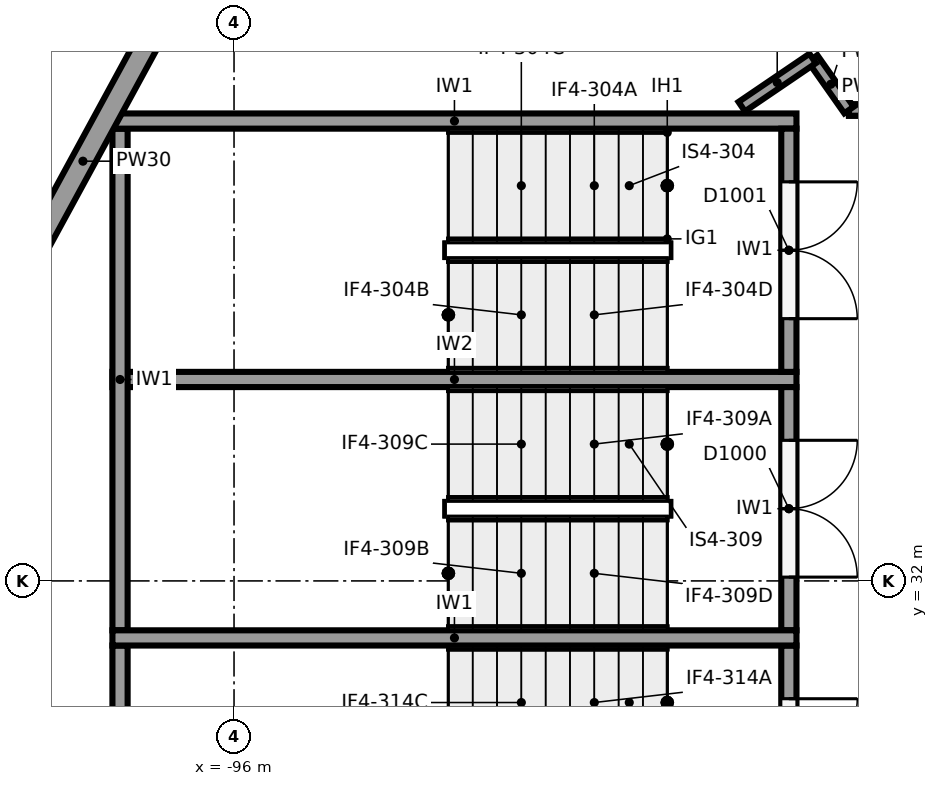
"""IFC4 building model, lengths in metres.
Left out: names, types, materials, properties, quantities, classifications, styles, units other than length and angle.
Written with IfcOpenShell. Run it as: python <this file> out.ifc"""

import sys

from ifc_helpers import new_model, si_unit, direction, frame, frame_2d, origin, place, context, subcontext, project, spatial, rectangle, extrude, element, fill, save


model = new_model("IFC4")
c1 = context("Model", 3, precision=1e-05, world=origin(), true_north=direction((0.0, 1.0)))
c2 = subcontext(c1, "Body", "Model", "MODEL_VIEW")
j1 = project(units=[si_unit("LENGTHUNIT", "METRE"), si_unit("PLANEANGLEUNIT", "RADIAN")], contexts=[c1])
p1 = place(None, origin())
s1 = spatial("IfcSite", under=j1, at=p1, CompositionType="ELEMENT")
p2 = place(p1, origin())
s2 = spatial("IfcBuilding", under=s1, at=p2, CompositionType="ELEMENT")
p3 = place(p2, frame((0.0, 0.0, 12.0)))
s3 = spatial("IfcBuildingStorey", under=s2, at=p3, CompositionType="ELEMENT", Elevation=12.0)
p4 = place(p3, frame((-101.161, 31.689, 0.0), z_axis=(0.0, 0.0, 1.0), x_axis=(0.477867771117, 0.878431780691, 0.0)))
e1 = element("IfcWall", 1, at=p4, inside=s3, PredefinedType="SOLIDWALL", context=c2, shape_type="SweptSolid", body=[
    extrude(rectangle(XDim=13.28, YDim=0.3, at=frame_2d((6.64, 0.0))), origin(), (0.0, 0.0, 1.0), 4.35),
])
p5 = place(p4, frame((9.03, 0.0, 0.0)))
e2 = element("IfcOpeningElement", 2, at=p5, cuts=e1, PredefinedType="OPENING", context=c2, shape_type="SweptSolid", body=[
    extrude(rectangle(XDim=1.8, YDim=2.4, at=frame_2d((0.9, 1.2))), frame((0.0, 0.16, 0.0), z_axis=(0.0, -1.0, 0.0), x_axis=(1.0, 0.0, 0.0)), (0.0, 0.0, 1.0), 0.32),
])
p6 = place(p3, frame((-94.815, 19.145, 0.0), z_axis=(0.0, 0.0, 1.0), x_axis=(-0.477867771117, 0.878431780691, 0.0)))
e3 = element("IfcWall", 3, at=p6, inside=s3, PredefinedType="SOLIDWALL", context=c2, shape_type="SweptSolid", body=[
    extrude(rectangle(XDim=13.28, YDim=0.3, at=frame_2d((6.64, 0.0))), origin(), (0.0, 0.0, 1.0), 4.35),
])
for number, where, z_axis, x_axis in (
    (4, (-97.6, 38.05, 0.0), (0.0, 0.0, 1.0), (1.0, 0.0, 0.0)),
    (5, (-97.6, 31.25, 0.0), (0.0, 0.0, 1.0), (1.0, 0.0, 0.0)),
):
    element("IfcWall", number, at=place(p3, frame(where, z_axis=z_axis, x_axis=x_axis)), inside=s3, PredefinedType="SHEAR", context=c2, shape_type="SweptSolid", body=[
        extrude(rectangle(XDim=9.0, YDim=0.2, at=frame_2d((4.5, 0.0))), origin(), (0.0, 0.0, 1.0), 5.65),
    ])
for number, where, z_axis, x_axis in (
    (6, (-97.5, 37.95, 0.0), (0.0, 0.0, 1.0), (0.0, -1.0, 0.0)),
    (7, (-97.5, 31.15, 0.0), (0.0, 0.0, 1.0), (0.0, -1.0, 0.0)),
):
    element("IfcWall", number, at=place(p3, frame(where, z_axis=z_axis, x_axis=x_axis)), inside=s3, PredefinedType="SHEAR", context=c2, shape_type="SweptSolid", body=[
        extrude(rectangle(XDim=6.6, YDim=0.2, at=frame_2d((3.3, 0.0))), origin(), (0.0, 0.0, 1.0), 5.65),
    ])
p7 = place(p3, frame((-97.6, 34.65, 0.0), z_axis=(0.0, 0.0, 1.0), x_axis=(1.0, 0.0, 0.0)))
e8 = element("IfcWall", 8, at=p7, inside=s3, PredefinedType="SHEAR", context=c2, shape_type="SweptSolid", body=[
    extrude(rectangle(XDim=9.0, YDim=0.2, at=frame_2d((4.5, 0.0))), origin(), (0.0, 0.0, 1.0), 5.65),
])
p8 = place(p3, frame((-88.7, 37.95, 0.0), z_axis=(0.0, 0.0, 1.0), x_axis=(0.0, -1.0, 0.0)))
e9 = element("IfcWall", 9, at=p8, inside=s3, PredefinedType="SHEAR", context=c2, shape_type="SweptSolid", body=[
    extrude(rectangle(XDim=3.2, YDim=0.2, at=frame_2d((1.6, 0.0))), origin(), (0.0, 0.0, 1.0), 5.65),
])
p9 = place(p8, frame((0.7, 0.0, 0.0)))
e10 = element("IfcOpeningElement", 10, at=p9, cuts=e9, PredefinedType="OPENING", context=c2, shape_type="SweptSolid", body=[
    extrude(rectangle(XDim=1.8, YDim=2.1, at=frame_2d((0.9, 1.05))), frame((0.0, 0.11, 0.0), z_axis=(0.0, -1.0, 0.0), x_axis=(1.0, 0.0, 0.0)), (0.0, 0.0, 1.0), 0.22),
])
p10 = place(p3, frame((-88.7, 34.55, 0.0), z_axis=(0.0, 0.0, 1.0), x_axis=(0.0, -1.0, 0.0)))
e11 = element("IfcWall", 11, at=p10, inside=s3, PredefinedType="SHEAR", context=c2, shape_type="SweptSolid", body=[
    extrude(rectangle(XDim=3.2, YDim=0.2, at=frame_2d((1.6, 0.0))), origin(), (0.0, 0.0, 1.0), 5.65),
])
p11 = place(p10, frame((0.7, 0.0, 0.0)))
e12 = element("IfcOpeningElement", 12, at=p11, cuts=e11, PredefinedType="OPENING", context=c2, shape_type="SweptSolid", body=[
    extrude(rectangle(XDim=1.8, YDim=2.1, at=frame_2d((0.9, 1.05))), frame((0.0, 0.11, 0.0), z_axis=(0.0, -1.0, 0.0), x_axis=(1.0, 0.0, 0.0)), (0.0, 0.0, 1.0), 0.22),
])
p12 = place(p3, frame((-88.7, 31.15, 0.0), z_axis=(0.0, 0.0, 1.0), x_axis=(0.0, -1.0, 0.0)))
e13 = element("IfcWall", 13, at=p12, inside=s3, PredefinedType="SHEAR", context=c2, shape_type="SweptSolid", body=[
    extrude(rectangle(XDim=3.2, YDim=0.2, at=frame_2d((1.6, 0.0))), origin(), (0.0, 0.0, 1.0), 5.65),
])
p13 = place(p12, frame((0.7, 0.0, 0.0)))
e14 = element("IfcOpeningElement", 14, at=p13, cuts=e13, PredefinedType="OPENING", context=c2, shape_type="SweptSolid", body=[
    extrude(rectangle(XDim=1.8, YDim=2.1, at=frame_2d((0.9, 1.05))), frame((0.0, 0.11, 0.0), z_axis=(0.0, -1.0, 0.0), x_axis=(1.0, 0.0, 0.0)), (0.0, 0.0, 1.0), 0.22),
])
p14 = place(p3, frame((-81.555, 38.195, 0.0), z_axis=(0.0, 0.0, 1.0), x_axis=(-1.0, 0.0, 0.0)))
e15 = element("IfcWall", 15, at=p14, inside=s3, PredefinedType="PARTITIONING", context=c2, shape_type="SweptSolid", body=[
    extrude(rectangle(XDim=6.354, YDim=0.15, at=frame_2d((3.177, 0.0))), origin(), (0.0, 0.0, 1.0), 4.35),
])
p15 = place(p14, frame((3.85, 0.0, 0.0)))
e16 = element("IfcOpeningElement", 16, at=p15, cuts=e15, PredefinedType="OPENING", context=c2, shape_type="SweptSolid", body=[
    extrude(rectangle(XDim=1.8, YDim=2.1, at=frame_2d((0.9, 1.05))), frame((0.0, 0.085, 0.0), z_axis=(0.0, -1.0, 0.0), x_axis=(1.0, 0.0, 0.0)), (0.0, 0.0, 1.0), 0.17),
])
p16 = place(p3, frame((-87.255, 38.195, 4.35), z_axis=(0.0, 0.0, 1.0), x_axis=(-1.0, 0.0, 0.0)))
e17 = element("IfcWall", 17, at=p16, inside=s3, PredefinedType="PARTITIONING", context=c2, shape_type="SweptSolid", body=[
    extrude(rectangle(XDim=0.654, YDim=0.15, at=frame_2d((0.327, 0.0))), origin(), (0.0, 0.0, 1.0), 1.3),
])
p17 = place(p3, frame((-87.909, 38.195, 0.0), z_axis=(0.0, 0.0, 1.0), x_axis=(-0.575573582652, 0.81774999294, 0.0)))
e18 = element("IfcWall", 18, at=p17, inside=s3, PredefinedType="PARTITIONING", context=c2, shape_type="SweptSolid", body=[
    extrude(rectangle(XDim=0.83, YDim=0.15, at=frame_2d((0.415, 0.0))), origin(), (0.0, 0.0, 1.0), 5.65),
])
p18 = place(p3, frame((-88.387, 38.874, 0.0), z_axis=(0.0, 0.0, 1.0), x_axis=(-0.827055308354, -0.562120553728, 0.0)))
e19 = element("IfcWall", 19, at=p18, inside=s3, PredefinedType="PARTITIONING", context=c2, shape_type="SweptSolid", body=[
    extrude(rectangle(XDim=1.128, YDim=0.15, at=frame_2d((0.564, 0.0))), origin(), (0.0, 0.0, 1.0), 5.65),
])
p19 = place(p9, origin())
e20 = element("IfcDoor", 20, at=p19, inside=s3, OperationType="DOUBLE_DOOR_SINGLE_SWING", PredefinedType="DOOR", context=c2, shape_type="SweptSolid", body=[
    extrude(rectangle(XDim=1.8, YDim=2.1, at=frame_2d((0.9, 1.05))), frame((0.0, 0.025, 0.0), z_axis=(0.0, -1.0, 0.0), x_axis=(1.0, 0.0, 0.0)), (0.0, 0.0, 1.0), 0.05),
])
fill(e10, e20)
p20 = place(p11, origin())
e21 = element("IfcDoor", 21, at=p20, inside=s3, OperationType="DOUBLE_DOOR_SINGLE_SWING", PredefinedType="DOOR", context=c2, shape_type="SweptSolid", body=[
    extrude(rectangle(XDim=1.8, YDim=2.1, at=frame_2d((0.9, 1.05))), frame((0.0, 0.025, 0.0), z_axis=(0.0, -1.0, 0.0), x_axis=(1.0, 0.0, 0.0)), (0.0, 0.0, 1.0), 0.05),
])
fill(e12, e21)
p21 = place(p13, origin())
e22 = element("IfcDoor", 22, at=p21, inside=s3, OperationType="DOUBLE_DOOR_SINGLE_SWING", PredefinedType="DOOR", context=c2, shape_type="SweptSolid", body=[
    extrude(rectangle(XDim=1.8, YDim=2.1, at=frame_2d((0.9, 1.05))), frame((0.0, 0.025, 0.0), z_axis=(0.0, -1.0, 0.0), x_axis=(1.0, 0.0, 0.0)), (0.0, 0.0, 1.0), 0.05),
])
fill(e14, e22)
save(model, sys.argv[1])
